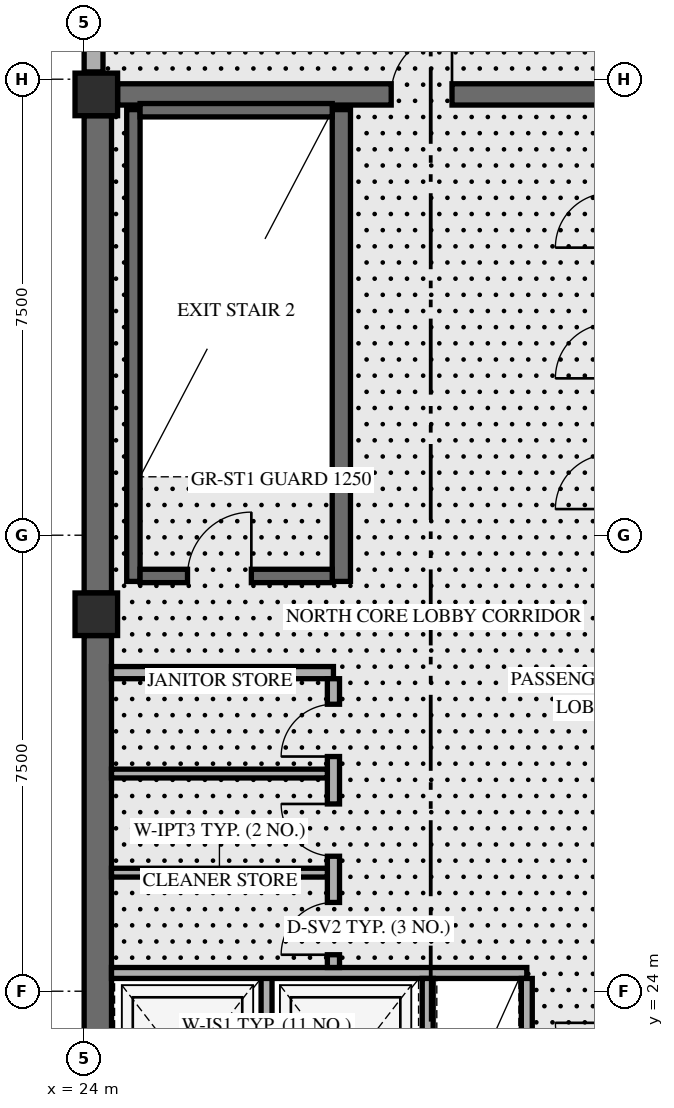
"""IFC4 building model, lengths in metres.
Left out: names, types, materials, properties, quantities, classifications, styles, units other than length and angle.
Written with IfcOpenShell. Run it as: python <this file> out.ifc"""

import sys

from ifc_helpers import new_model, si_unit, direction, frame, frame_2d, origin, origin_2d, place, context, subcontext, project, spatial, rectangle, extrude, element, fill, save


model = new_model("IFC4")
c1 = context("Model", 3, precision=1e-05, world=origin(), true_north=direction((0.0, 1.0)))
c2 = subcontext(c1, "Body", "Model", "MODEL_VIEW")
j1 = project(units=[si_unit("LENGTHUNIT", "METRE"), si_unit("PLANEANGLEUNIT", "RADIAN")], contexts=[c1])
p1 = place(None, origin())
s1 = spatial("IfcSite", under=j1, at=p1, CompositionType="ELEMENT")
p2 = place(p1, origin())
s2 = spatial("IfcBuilding", under=s1, at=p2, CompositionType="ELEMENT")
p3 = place(p2, frame((0.0, 0.0, 287.0)))
s3 = spatial("IfcBuildingStorey", under=s2, at=p3, CompositionType="ELEMENT", Elevation=287.0)
p4 = place(p3, frame((24.225, 17.9, 0.0), z_axis=(0.0, 0.0, 1.0), x_axis=(0.0, 1.0, 0.0)))
e1 = element("IfcWall", 1, at=p4, inside=s3, PredefinedType="SHEAR", context=c2, shape_type="SweptSolid", body=[
    extrude(rectangle(XDim=11.95, YDim=0.45, at=frame_2d((5.975, 0.0))), origin(), (0.0, 0.0, 1.0), 5.161),
])
p5 = place(p3, frame((24.225, 30.55, 0.0), z_axis=(0.0, 0.0, 1.0), x_axis=(0.0, 1.0, 0.0)))
e2 = element("IfcWall", 2, at=p5, inside=s3, PredefinedType="SHEAR", context=c2, shape_type="SweptSolid", body=[
    extrude(rectangle(XDim=7.85, YDim=0.45, at=frame_2d((3.925, 0.0))), origin(), (0.0, 0.0, 1.0), 5.161),
])
p6 = place(p3, frame((24.55, 38.75, 0.0), z_axis=(0.0, 0.0, 1.0), x_axis=(1.0, 0.0, 0.0)))
e3 = element("IfcWall", 3, at=p6, inside=s3, PredefinedType="SHEAR", context=c2, shape_type="SweptSolid", body=[
    extrude(rectangle(XDim=10.3, YDim=0.35, at=frame_2d((5.15, 0.0))), origin(), (0.0, 0.0, 1.0), 5.7),
])
p7 = place(p6, frame((4.5, 0.0, 0.0)))
e4 = element("IfcOpeningElement", 4, at=p7, cuts=e3, PredefinedType="OPENING", context=c2, shape_type="SweptSolid", body=[
    extrude(rectangle(XDim=1.0, YDim=2.15, at=frame_2d((0.5, 1.075))), frame((0.0, 0.185, 0.0), z_axis=(0.0, -1.0, 0.0), x_axis=(1.0, 0.0, 0.0)), (0.0, 0.0, 1.0), 0.37),
])
p8 = place(p3, frame((24.81, 30.74, 0.0), z_axis=(0.0, 0.0, 1.0), x_axis=(0.0, 1.0, 0.0)))
e5 = element("IfcWall", 5, at=p8, inside=s3, PredefinedType="SHEAR", context=c2, shape_type="SweptSolid", body=[
    extrude(rectangle(XDim=7.76, YDim=0.22, at=frame_2d((3.88, 0.0))), origin(), (0.0, 0.0, 1.0), 5.7),
])
p9 = place(p3, frame((28.23, 30.74, 0.0), z_axis=(0.0, 0.0, 1.0), x_axis=(0.0, 1.0, 0.0)))
e6 = element("IfcWall", 6, at=p9, inside=s3, PredefinedType="SHEAR", context=c2, shape_type="SweptSolid", body=[
    extrude(rectangle(XDim=7.76, YDim=0.3, at=frame_2d((3.88, 0.0))), origin(), (0.0, 0.0, 1.0), 5.7),
])
p10 = place(p3, frame((24.92, 30.83, 0.0), z_axis=(0.0, 0.0, 1.0), x_axis=(1.0, 0.0, 0.0)))
e7 = element("IfcWall", 7, at=p10, inside=s3, PredefinedType="SHEAR", context=c2, shape_type="SweptSolid", body=[
    extrude(rectangle(XDim=3.16, YDim=0.22, at=frame_2d((1.58, 0.0))), origin(), (0.0, 0.0, 1.0), 5.7),
])
p11 = place(p10, frame((0.78, 0.0, 0.0)))
e8 = element("IfcOpeningElement", 8, at=p11, cuts=e7, PredefinedType="OPENING", context=c2, shape_type="SweptSolid", body=[
    extrude(rectangle(XDim=1.05, YDim=2.15, at=frame_2d((0.525, 1.075))), frame((0.0, 0.12, 0.0), z_axis=(0.0, -1.0, 0.0), x_axis=(1.0, 0.0, 0.0)), (0.0, 0.0, 1.0), 0.24),
])
p12 = place(p3, frame((24.92, 38.49, 0.0), z_axis=(0.0, 0.0, 1.0), x_axis=(1.0, 0.0, 0.0)))
e9 = element("IfcWall", 9, at=p12, inside=s3, PredefinedType="SHEAR", context=c2, shape_type="SweptSolid", body=[
    extrude(rectangle(XDim=3.16, YDim=0.22, at=frame_2d((1.58, 0.0))), origin(), (0.0, 0.0, 1.0), 5.7),
])
for number, where, z_axis, x_axis in (
    (10, (24.2, 30.2, 0.0), (0.0, 0.0, 1.0), (1.0, 0.0, 0.0)),
    (11, (24.2, 38.75, 0.0), (0.0, 0.0, 1.0), (1.0, 0.0, 0.0)),
):
    element("IfcColumn", number, at=place(p3, frame(where, z_axis=z_axis, x_axis=x_axis)), inside=s3, PredefinedType="COLUMN", context=c2, shape_type="SweptSolid", body=[
        extrude(rectangle(XDim=0.7, YDim=0.7, at=origin_2d()), origin(), (0.0, 0.0, 1.0), 5.996),
    ])
p13 = place(p3, frame((24.155, 39.12, 0.0), z_axis=(0.0, 0.0, 1.0), x_axis=(0.0, 1.0, 0.0)))
e12 = element("IfcWall", 12, at=p13, inside=s3, PredefinedType="SOLIDWALL", context=c2, shape_type="SweptSolid", body=[
    extrude(rectangle(XDim=1.56, YDim=0.31, at=frame_2d((0.78, 0.0))), origin(), (0.0, 0.0, 1.0), 5.143),
])
p14 = place(p3, frame((27.0, 21.19, 0.0), z_axis=(0.0, 0.0, 1.0), x_axis=(0.0, 1.0, 0.0)))
e13 = element("IfcWall", 13, at=p14, inside=s3, PredefinedType="STANDARD", context=c2, shape_type="SweptSolid", body=[
    extrude(rectangle(XDim=3.11, YDim=0.18, at=frame_2d((1.555, 0.0))), origin(), (0.0, 0.0, 1.0), 5.7),
])
p15 = place(p3, frame((24.45, 24.3, 0.0), z_axis=(0.0, 0.0, 1.0), x_axis=(1.0, 0.0, 0.0)))
e14 = element("IfcWall", 14, at=p15, inside=s3, PredefinedType="STANDARD", context=c2, shape_type="SweptSolid", body=[
    extrude(rectangle(XDim=6.83, YDim=0.18, at=frame_2d((3.415, 0.0))), origin(), (0.0, 0.0, 1.0), 5.7),
])
for number, where, z_axis, x_axis in (
    (15, (29.65, 21.19, 0.0), (0.0, 0.0, 1.0), (0.0, 1.0, 0.0)),
    (16, (31.28, 21.19, 0.0), (0.0, 0.0, 1.0), (0.0, 1.0, 0.0)),
):
    element("IfcWall", number, at=place(p3, frame(where, z_axis=z_axis, x_axis=x_axis)), inside=s3, PredefinedType="STANDARD", context=c2, shape_type="SweptSolid", body=[
        extrude(rectangle(XDim=3.02, YDim=0.18, at=frame_2d((1.51, 0.0))), origin(), (0.0, 0.0, 1.0), 5.7),
    ])
p16 = place(p3, frame((24.45, 29.24, 0.0), z_axis=(0.0, 0.0, 1.0), x_axis=(1.0, 0.0, 0.0)))
e17 = element("IfcWall", 17, at=p16, inside=s3, PredefinedType="STANDARD", context=c2, shape_type="SweptSolid", body=[
    extrude(rectangle(XDim=3.65, YDim=0.2, at=frame_2d((1.825, 0.0))), origin(), (0.0, 0.0, 1.0), 5.7),
])
p17 = place(p3, frame((28.1, 24.39, 0.0), z_axis=(0.0, 0.0, 1.0), x_axis=(0.0, 1.0, 0.0)))
e18 = element("IfcWall", 18, at=p17, inside=s3, PredefinedType="STANDARD", context=c2, shape_type="SweptSolid", body=[
    extrude(rectangle(XDim=4.75, YDim=0.2, at=frame_2d((2.375, 0.0))), origin(), (0.0, 0.0, 1.0), 5.7),
])
p18 = place(p17, frame((0.21, 0.0, 0.0)))
e19 = element("IfcOpeningElement", 19, at=p18, cuts=e18, PredefinedType="OPENING", context=c2, shape_type="SweptSolid", body=[
    extrude(rectangle(XDim=0.86, YDim=2.1, at=frame_2d((0.43, 1.05))), frame((0.0, 0.11, 0.0), z_axis=(0.0, -1.0, 0.0), x_axis=(1.0, 0.0, 0.0)), (0.0, 0.0, 1.0), 0.22),
])
p19 = place(p17, frame((1.83, 0.0, 0.0)))
e20 = element("IfcOpeningElement", 20, at=p19, cuts=e18, PredefinedType="OPENING", context=c2, shape_type="SweptSolid", body=[
    extrude(rectangle(XDim=0.86, YDim=2.1, at=frame_2d((0.43, 1.05))), frame((0.0, 0.11, 0.0), z_axis=(0.0, -1.0, 0.0), x_axis=(1.0, 0.0, 0.0)), (0.0, 0.0, 1.0), 0.22),
])
p20 = place(p17, frame((3.47, 0.0, 0.0)))
e21 = element("IfcOpeningElement", 21, at=p20, cuts=e18, PredefinedType="OPENING", context=c2, shape_type="SweptSolid", body=[
    extrude(rectangle(XDim=0.86, YDim=2.1, at=frame_2d((0.43, 1.05))), frame((0.0, 0.11, 0.0), z_axis=(0.0, -1.0, 0.0), x_axis=(1.0, 0.0, 0.0)), (0.0, 0.0, 1.0), 0.22),
])
for number, where, z_axis, x_axis in (
    (22, (24.45, 25.95, 0.0), (0.0, 0.0, 1.0), (1.0, 0.0, 0.0)),
    (23, (24.45, 27.58, 0.0), (0.0, 0.0, 1.0), (1.0, 0.0, 0.0)),
):
    element("IfcWall", number, at=place(p3, frame(where, z_axis=z_axis, x_axis=x_axis)), inside=s3, PredefinedType="PARTITIONING", context=c2, shape_type="SweptSolid", body=[
        extrude(rectangle(XDim=3.55, YDim=0.145, at=frame_2d((1.775, 0.0))), origin(), (0.0, 0.0, 1.0), 5.7),
    ])
p21 = place(p11, origin())
e24 = element("IfcDoor", 24, at=p21, inside=s3, OperationType="SINGLE_SWING_RIGHT", PredefinedType="DOOR", context=c2, shape_type="SweptSolid", body=[
    extrude(rectangle(XDim=1.05, YDim=2.15, at=frame_2d((0.525, 1.075))), frame((0.0, 0.025, 0.0), z_axis=(0.0, -1.0, 0.0), x_axis=(1.0, 0.0, 0.0)), (0.0, 0.0, 1.0), 0.05),
])
fill(e8, e24)
p22 = place(p18, origin())
e25 = element("IfcDoor", 25, at=p22, inside=s3, OperationType="SINGLE_SWING_LEFT", PredefinedType="DOOR", context=c2, shape_type="SweptSolid", body=[
    extrude(rectangle(XDim=0.86, YDim=2.1, at=frame_2d((0.43, 1.05))), frame((0.0, 0.025, 0.0), z_axis=(0.0, -1.0, 0.0), x_axis=(1.0, 0.0, 0.0)), (0.0, 0.0, 1.0), 0.05),
])
fill(e19, e25)
p23 = place(p19, origin())
e26 = element("IfcDoor", 26, at=p23, inside=s3, OperationType="SINGLE_SWING_RIGHT", PredefinedType="DOOR", context=c2, shape_type="SweptSolid", body=[
    extrude(rectangle(XDim=0.86, YDim=2.1, at=frame_2d((0.43, 1.05))), frame((0.0, 0.025, 0.0), z_axis=(0.0, -1.0, 0.0), x_axis=(1.0, 0.0, 0.0)), (0.0, 0.0, 1.0), 0.05),
])
fill(e20, e26)
p24 = place(p20, origin())
e27 = element("IfcDoor", 27, at=p24, inside=s3, OperationType="SINGLE_SWING_LEFT", PredefinedType="DOOR", context=c2, shape_type="SweptSolid", body=[
    extrude(rectangle(XDim=0.86, YDim=2.1, at=frame_2d((0.43, 1.05))), frame((0.0, 0.025, 0.0), z_axis=(0.0, -1.0, 0.0), x_axis=(1.0, 0.0, 0.0)), (0.0, 0.0, 1.0), 0.05),
])
fill(e21, e27)
p25 = place(p7, origin())
e28 = element("IfcDoor", 28, at=p25, inside=s3, OperationType="SINGLE_SWING_RIGHT", PredefinedType="DOOR", context=c2, shape_type="SweptSolid", body=[
    extrude(rectangle(XDim=1.0, YDim=2.15, at=frame_2d((0.5, 1.075))), frame((0.0, 0.025, 0.0), z_axis=(0.0, -1.0, 0.0), x_axis=(1.0, 0.0, 0.0)), (0.0, 0.0, 1.0), 0.05),
])
fill(e4, e28)
save(model, sys.argv[1])
